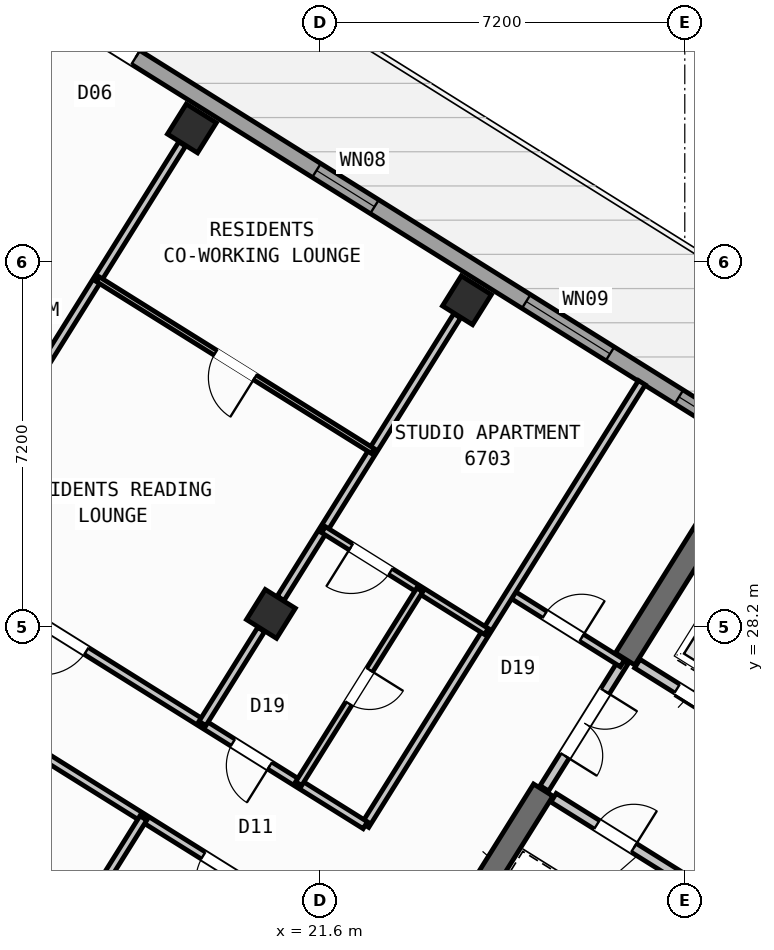
"""IFC4 building model, lengths in metres.
Left out: names, types, materials, properties, quantities, classifications, styles, units other than length and angle.
Written with IfcOpenShell. Run it as: python <this file> out.ifc"""

import sys

from ifc_helpers import new_model, si_unit, direction, frame, frame_2d, origin, origin_2d, place, context, subcontext, project, spatial, rectangle, hollow_rectangle, extrude, source, transform, mapped, element, fill, save


model = new_model("IFC4")
c1 = context("Model", 3, precision=1e-05, world=origin(), true_north=direction((0.0, 1.0)))
c2 = subcontext(c1, "Body", "Model", "MODEL_VIEW")
j1 = project(units=[si_unit("LENGTHUNIT", "METRE"), si_unit("PLANEANGLEUNIT", "RADIAN")], contexts=[c1])
p1 = place(None, origin())
s1 = spatial("IfcSite", under=j1, at=p1, CompositionType="ELEMENT")
p2 = place(p1, origin())
s2 = spatial("IfcBuilding", under=s1, at=p2, CompositionType="ELEMENT")
p3 = place(p2, frame((0.0, 0.0, 266.4)))
s3 = spatial("IfcBuildingStorey", under=s2, at=p3, CompositionType="ELEMENT", Elevation=266.4)
p4 = place(p3, frame((29.544, 30.636, 0.0), z_axis=(0.0, 0.0, 1.0), x_axis=(-0.529902075036, -0.848058836916, 0.0)))
e1 = element("IfcWall", 1, at=p4, inside=s3, PredefinedType="SHEAR", context=c2, shape_type="SweptSolid", body=[
    extrude(rectangle(XDim=3.625, YDim=0.45, at=frame_2d((1.812, 0.0))), origin(), (0.0, 0.0, 1.0), 3.35),
])
p5 = place(p3, frame((26.007, 24.976, 0.0), z_axis=(0.0, 0.0, 1.0), x_axis=(-0.529931155655, -0.848040665456, 0.0)))
e2 = element("IfcWall", 2, at=p5, inside=s3, PredefinedType="SHEAR", context=c2, shape_type="SweptSolid", body=[
    extrude(rectangle(XDim=6.475, YDim=0.45, at=frame_2d((3.238, 0.0))), origin(), (0.0, 0.0, 1.0), 3.35),
])
m1 = source(origin(), c2, "Body", "SweptSolid", [
    extrude(hollow_rectangle(XDim=0.7, YDim=0.7, WallThickness=0.028, at=origin_2d()), origin(), (0.0, 0.0, 1.0), 3.6),
])
for number, where, z_axis, x_axis in (
    (3, (24.5, 34.643, 0.0), (0.0, 0.0, 1.0), (-0.848, 0.53, 0.0)),
    (4, (20.632, 28.452, 0.0), (0.0, 0.0, 1.0), (-0.848, 0.53, 0.0)),
    (5, (19.073, 38.034, 0.0), (0.0, 0.0, 1.0), (-0.848, 0.53, 0.0)),
):
    element("IfcColumn", number, at=place(p3, frame(where, z_axis=z_axis, x_axis=x_axis)), inside=s3, PredefinedType="COLUMN", context=c2, shape_type="MappedRepresentation", body=[
        mapped(m1, transform((0.0, 0.0, 0.0), scale=1.0)),
    ])
p6 = place(p3, frame((14.138, 41.825, 0.0), z_axis=(0.0, 0.0, 1.0), x_axis=(0.848046498049, -0.529921821731, 0.0)))
e6 = element("IfcWall", 6, at=p6, inside=s3, PredefinedType="STANDARD", context=c2, shape_type="SweptSolid", body=[
    extrude(rectangle(XDim=31.588, YDim=0.32, at=frame_2d((15.794, 0.0))), origin(), (0.0, 0.0, 1.0), 3.35),
])
p7 = place(p6, frame((3.46, 0.0, 0.0)))
e7 = element("IfcOpeningElement", 7, at=p7, cuts=e6, PredefinedType="OPENING", context=c2, shape_type="SweptSolid", body=[
    extrude(rectangle(XDim=1.05, YDim=2.15, at=frame_2d((0.525, 1.075))), frame((0.0, 0.17, 0.0), z_axis=(0.0, -1.0, 0.0), x_axis=(1.0, 0.0, 0.0)), (0.0, 0.0, 1.0), 0.34),
])
p8 = place(p6, frame((0.831, 0.0, 1.0)))
e8 = element("IfcOpeningElement", 8, at=p8, cuts=e6, PredefinedType="OPENING", context=c2, shape_type="SweptSolid", body=[
    extrude(rectangle(XDim=0.9, YDim=1.25, at=frame_2d((0.45, 0.625))), frame((0.0, 0.17, 0.0), z_axis=(0.0, -1.0, 0.0), x_axis=(1.0, 0.0, 0.0)), (0.0, 0.0, 1.0), 0.34),
])
p9 = place(p6, frame((8.719, 0.0, 0.9)))
e9 = element("IfcOpeningElement", 9, at=p9, cuts=e6, PredefinedType="OPENING", context=c2, shape_type="SweptSolid", body=[
    extrude(rectangle(XDim=1.35, YDim=1.45, at=frame_2d((0.675, 0.725))), frame((0.0, 0.17, 0.0), z_axis=(0.0, -1.0, 0.0), x_axis=(1.0, 0.0, 0.0)), (0.0, 0.0, 1.0), 0.34),
])
p10 = place(p6, frame((13.599, 0.0, 0.95)))
e10 = element("IfcOpeningElement", 10, at=p10, cuts=e6, PredefinedType="OPENING", context=c2, shape_type="SweptSolid", body=[
    extrude(rectangle(XDim=1.95, YDim=1.35, at=frame_2d((0.975, 0.675))), frame((0.0, 0.17, 0.0), z_axis=(0.0, -1.0, 0.0), x_axis=(1.0, 0.0, 0.0)), (0.0, 0.0, 1.0), 0.34),
])
p11 = place(p6, frame((17.154, 0.0, 1.0)))
e11 = element("IfcOpeningElement", 11, at=p11, cuts=e6, PredefinedType="OPENING", context=c2, shape_type="SweptSolid", body=[
    extrude(rectangle(XDim=0.9, YDim=1.25, at=frame_2d((0.45, 0.625))), frame((0.0, 0.17, 0.0), z_axis=(0.0, -1.0, 0.0), x_axis=(1.0, 0.0, 0.0)), (0.0, 0.0, 1.0), 0.34),
])
p12 = place(p6, frame((21.719, 0.0, 0.9)))
e12 = element("IfcOpeningElement", 12, at=p12, cuts=e6, PredefinedType="OPENING", context=c2, shape_type="SweptSolid", body=[
    extrude(rectangle(XDim=1.65, YDim=1.45, at=frame_2d((0.825, 0.725))), frame((0.0, 0.17, 0.0), z_axis=(0.0, -1.0, 0.0), x_axis=(1.0, 0.0, 0.0)), (0.0, 0.0, 1.0), 0.34),
])
p13 = place(p6, frame((27.419, 0.0, 0.9)))
e13 = element("IfcOpeningElement", 13, at=p13, cuts=e6, PredefinedType="OPENING", context=c2, shape_type="SweptSolid", body=[
    extrude(rectangle(XDim=1.65, YDim=1.45, at=frame_2d((0.825, 0.725))), frame((0.0, 0.17, 0.0), z_axis=(0.0, -1.0, 0.0), x_axis=(1.0, 0.0, 0.0)), (0.0, 0.0, 1.0), 0.34),
])
p14 = place(p3, frame((31.822, 24.998, 0.0), z_axis=(0.0, 0.0, 1.0), x_axis=(-0.848054125777, 0.529909614701, 0.0)))
e14 = element("IfcWall", 14, at=p14, inside=s3, PredefinedType="STANDARD", context=c2, shape_type="SweptSolid", body=[
    extrude(rectangle(XDim=4.668, YDim=0.2, at=frame_2d((2.334, 0.0))), origin(), (0.0, 0.0, 1.0), 3.34),
])
p15 = place(p14, frame((0.52, 0.0, 0.0)))
e15 = element("IfcOpeningElement", 15, at=p15, cuts=e14, PredefinedType="OPENING", context=c2, shape_type="SweptSolid", body=[
    extrude(rectangle(XDim=1.2, YDim=2.15, at=frame_2d((0.6, 1.075))), frame((0.0, 0.11, 0.0), z_axis=(0.0, -1.0, 0.0), x_axis=(1.0, 0.0, 0.0)), (0.0, 0.0, 1.0), 0.22),
])
p16 = place(p14, frame((2.54, 0.0, 0.0)))
e16 = element("IfcOpeningElement", 16, at=p16, cuts=e14, PredefinedType="OPENING", context=c2, shape_type="SweptSolid", body=[
    extrude(rectangle(XDim=1.2, YDim=2.15, at=frame_2d((0.6, 1.075))), frame((0.0, 0.11, 0.0), z_axis=(0.0, -1.0, 0.0), x_axis=(1.0, 0.0, 0.0)), (0.0, 0.0, 1.0), 0.22),
])
p17 = place(p3, frame((31.525, 21.504, 0.0), z_axis=(0.0, 0.0, 1.0), x_axis=(-0.848042066329, 0.529928913853, 0.0)))
e17 = element("IfcWall", 17, at=p17, inside=s3, PredefinedType="STANDARD", context=c2, shape_type="SweptSolid", body=[
    extrude(rectangle(XDim=6.268, YDim=0.2, at=frame_2d((3.134, 0.0))), origin(), (0.0, 0.0, 1.0), 3.34),
])
p18 = place(p17, frame((4.4, 0.0, 0.0)))
e18 = element("IfcOpeningElement", 18, at=p18, cuts=e17, PredefinedType="OPENING", context=c2, shape_type="SweptSolid", body=[
    extrude(rectangle(XDim=0.86, YDim=2.05, at=frame_2d((0.43, 1.025))), frame((0.0, 0.11, 0.0), z_axis=(0.0, -1.0, 0.0), x_axis=(1.0, 0.0, 0.0)), (0.0, 0.0, 1.0), 0.22),
])
p19 = place(p17, frame((1.45, 0.0, 0.0)))
e19 = element("IfcOpeningElement", 19, at=p19, cuts=e17, PredefinedType="OPENING", context=c2, shape_type="SweptSolid", body=[
    extrude(rectangle(XDim=0.86, YDim=2.05, at=frame_2d((0.43, 1.025))), frame((0.0, 0.11, 0.0), z_axis=(0.0, -1.0, 0.0), x_axis=(1.0, 0.0, 0.0)), (0.0, 0.0, 1.0), 0.22),
])
p20 = place(p3, frame((27.596, 27.52, 0.0), z_axis=(0.0, 0.0, 1.0), x_axis=(-0.529865479138, -0.848081702443, 0.0)))
e20 = element("IfcWall", 20, at=p20, inside=s3, PredefinedType="STANDARD", context=c2, shape_type="SweptSolid", body=[
    extrude(rectangle(XDim=2.96, YDim=0.2, at=frame_2d((1.48, 0.0))), origin(), (0.0, 0.0, 1.0), 3.34),
])
p21 = place(p20, frame((0.7, 0.0, 0.0)))
e21 = element("IfcOpeningElement", 21, at=p21, cuts=e20, PredefinedType="OPENING", context=c2, shape_type="SweptSolid", body=[
    extrude(rectangle(XDim=1.5, YDim=2.15, at=frame_2d((0.75, 1.075))), frame((0.0, 0.11, 0.0), z_axis=(0.0, -1.0, 0.0), x_axis=(1.0, 0.0, 0.0)), (0.0, 0.0, 1.0), 0.22),
])
p22 = place(p3, frame((27.57, 27.478, 0.0), z_axis=(0.0, 0.0, 1.0), x_axis=(-0.848050851465, 0.529914854792, 0.0)))
e22 = element("IfcWall", 22, at=p22, inside=s3, PredefinedType="PARTITIONING", context=c2, shape_type="SweptSolid", body=[
    extrude(rectangle(XDim=2.61, YDim=0.16, at=frame_2d((1.305, 0.0))), origin(), (0.0, 0.0, 1.0), 3.34),
])
p23 = place(p22, frame((0.95, 0.0, 0.0)))
e23 = element("IfcOpeningElement", 23, at=p23, cuts=e22, PredefinedType="OPENING", context=c2, shape_type="SweptSolid", body=[
    extrude(rectangle(XDim=0.86, YDim=2.05, at=frame_2d((0.43, 1.025))), frame((0.0, 0.09, 0.0), z_axis=(0.0, -1.0, 0.0), x_axis=(1.0, 0.0, 0.0)), (0.0, 0.0, 1.0), 0.18),
])
p24 = place(p3, frame((27.953, 33.016, 0.0), z_axis=(0.0, 0.0, 1.0), x_axis=(-0.529909450694, -0.848054228257, 0.0)))
e24 = element("IfcWall", 24, at=p24, inside=s3, PredefinedType="PARTITIONING", context=c2, shape_type="SweptSolid", body=[
    extrude(rectangle(XDim=10.3, YDim=0.16, at=frame_2d((5.15, 0.0))), origin(), (0.0, 0.0, 1.0), 3.34),
])
p25 = place(p3, frame((22.495, 24.281, 0.0), z_axis=(0.0, 0.0, 1.0), x_axis=(-0.848052408131, 0.529912363569, 0.0)))
e25 = element("IfcWall", 25, at=p25, inside=s3, PredefinedType="PARTITIONING", context=c2, shape_type="SweptSolid", body=[
    extrude(rectangle(XDim=16.73, YDim=0.16, at=frame_2d((8.365, 0.0))), origin(), (0.0, 0.0, 1.0), 3.34),
])
p26 = place(p25, frame((2.22, 0.0, 0.0)))
e26 = element("IfcOpeningElement", 26, at=p26, cuts=e25, PredefinedType="OPENING", context=c2, shape_type="SweptSolid", body=[
    extrude(rectangle(XDim=0.86, YDim=2.05, at=frame_2d((0.43, 1.025))), frame((0.0, 0.09, 0.0), z_axis=(0.0, -1.0, 0.0), x_axis=(1.0, 0.0, 0.0)), (0.0, 0.0, 1.0), 0.18),
])
p27 = place(p25, frame((6.49, 0.0, 0.0)))
e27 = element("IfcOpeningElement", 27, at=p27, cuts=e25, PredefinedType="OPENING", context=c2, shape_type="SweptSolid", body=[
    extrude(rectangle(XDim=1.0, YDim=2.1, at=frame_2d((0.5, 1.05))), frame((0.0, 0.09, 0.0), z_axis=(0.0, -1.0, 0.0), x_axis=(1.0, 0.0, 0.0)), (0.0, 0.0, 1.0), 0.18),
])
p28 = place(p25, frame((14.76, 0.0, 0.0)))
e28 = element("IfcOpeningElement", 28, at=p28, cuts=e25, PredefinedType="OPENING", context=c2, shape_type="SweptSolid", body=[
    extrude(rectangle(XDim=1.0, YDim=2.1, at=frame_2d((0.5, 1.05))), frame((0.0, 0.09, 0.0), z_axis=(0.0, -1.0, 0.0), x_axis=(1.0, 0.0, 0.0)), (0.0, 0.0, 1.0), 0.18),
])
p29 = place(p3, frame((21.329, 22.416, 0.0), z_axis=(0.0, 0.0, 1.0), x_axis=(-0.848052408131, 0.529912363569, 0.0)))
e29 = element("IfcWall", 29, at=p29, inside=s3, PredefinedType="PARTITIONING", context=c2, shape_type="SweptSolid", body=[
    extrude(rectangle(XDim=16.73, YDim=0.16, at=frame_2d((8.365, 0.0))), origin(), (0.0, 0.0, 1.0), 3.34),
])
p30 = place(p29, frame((1.395, 0.0, 0.0)))
e30 = element("IfcOpeningElement", 30, at=p30, cuts=e29, PredefinedType="OPENING", context=c2, shape_type="SweptSolid", body=[
    extrude(rectangle(XDim=1.0, YDim=2.1, at=frame_2d((0.5, 1.05))), frame((0.0, 0.09, 0.0), z_axis=(0.0, -1.0, 0.0), x_axis=(1.0, 0.0, 0.0)), (0.0, 0.0, 1.0), 0.18),
])
p31 = place(p29, frame((7.82, 0.0, 0.0)))
e31 = element("IfcOpeningElement", 31, at=p31, cuts=e29, PredefinedType="OPENING", context=c2, shape_type="SweptSolid", body=[
    extrude(rectangle(XDim=1.0, YDim=2.1, at=frame_2d((0.5, 1.05))), frame((0.0, 0.09, 0.0), z_axis=(0.0, -1.0, 0.0), x_axis=(1.0, 0.0, 0.0)), (0.0, 0.0, 1.0), 0.18),
])
p32 = place(p29, frame((11.14, 0.0, 0.0)))
e32 = element("IfcOpeningElement", 32, at=p32, cuts=e29, PredefinedType="OPENING", context=c2, shape_type="SweptSolid", body=[
    extrude(rectangle(XDim=1.0, YDim=2.1, at=frame_2d((0.5, 1.05))), frame((0.0, 0.09, 0.0), z_axis=(0.0, -1.0, 0.0), x_axis=(1.0, 0.0, 0.0)), (0.0, 0.0, 1.0), 0.18),
])
p33 = place(p3, frame((18.115, 24.424, 0.0), z_axis=(0.0, 0.0, 1.0), x_axis=(-0.529998940003, -0.847998304005, 0.0)))
e33 = element("IfcWall", 33, at=p33, inside=s3, PredefinedType="PARTITIONING", context=c2, shape_type="SweptSolid", body=[
    extrude(rectangle(XDim=2.188, YDim=0.16, at=frame_2d((1.094, 0.0))), origin(), (0.0, 0.0, 1.0), 2.875),
])
p34 = place(p3, frame((24.309, 34.336, 0.0), z_axis=(0.0, 0.0, 1.0), x_axis=(-0.529895484599, -0.848062954858, 0.0)))
e34 = element("IfcWall", 34, at=p34, inside=s3, PredefinedType="PARTITIONING", context=c2, shape_type="SweptSolid", body=[
    extrude(rectangle(XDim=6.576, YDim=0.16, at=frame_2d((3.288, 0.0))), origin(), (0.0, 0.0, 1.0), 2.875),
])
p35 = place(p3, frame((20.44, 28.145, 0.0), z_axis=(0.0, 0.0, 1.0), x_axis=(-0.5299186965, -0.848048450915, 0.0)))
e35 = element("IfcWall", 35, at=p35, inside=s3, PredefinedType="PARTITIONING", context=c2, shape_type="SweptSolid", body=[
    extrude(rectangle(XDim=2.188, YDim=0.16, at=frame_2d((1.094, 0.0))), origin(), (0.0, 0.0, 1.0), 2.875),
])
p36 = place(p3, frame((24.885, 28.106, 0.0), z_axis=(0.0, 0.0, 1.0), x_axis=(-0.848059820872, 0.529900500304, 0.0)))
e36 = element("IfcWall", 36, at=p36, inside=s3, PredefinedType="PLUMBINGWALL", context=c2, shape_type="SweptSolid", body=[
    extrude(rectangle(XDim=3.79, YDim=0.14, at=frame_2d((1.895, 0.0))), origin(), (0.0, 0.0, 1.0), 3.34),
])
p37 = place(p36, frame((2.23, 0.0, 0.0)))
e37 = element("IfcOpeningElement", 37, at=p37, cuts=e36, PredefinedType="OPENING", context=c2, shape_type="SweptSolid", body=[
    extrude(rectangle(XDim=0.92, YDim=2.08, at=frame_2d((0.46, 1.04))), frame((0.0, 0.08, 0.0), z_axis=(0.0, -1.0, 0.0), x_axis=(1.0, 0.0, 0.0)), (0.0, 0.0, 1.0), 0.16),
])
p38 = place(p3, frame((23.57, 28.927, 0.0), z_axis=(0.0, 0.0, 1.0), x_axis=(-0.529911350634, -0.84805304107, 0.0)))
e38 = element("IfcWall", 38, at=p38, inside=s3, PredefinedType="PLUMBINGWALL", context=c2, shape_type="SweptSolid", body=[
    extrude(rectangle(XDim=4.51, YDim=0.14, at=frame_2d((2.255, 0.0))), origin(), (0.0, 0.0, 1.0), 3.025),
])
p39 = place(p38, frame((1.865, 0.0, 0.0)))
e39 = element("IfcOpeningElement", 39, at=p39, cuts=e38, PredefinedType="OPENING", context=c2, shape_type="SweptSolid", body=[
    extrude(rectangle(XDim=0.78, YDim=2.05, at=frame_2d((0.39, 1.025))), frame((0.0, 0.08, 0.0), z_axis=(0.0, -1.0, 0.0), x_axis=(1.0, 0.0, 0.0)), (0.0, 0.0, 1.0), 0.16),
])
p40 = place(p3, frame((18.881, 37.727, 0.0), z_axis=(0.0, 0.0, 1.0), x_axis=(-0.529938869374, -0.84803584519, 0.0)))
e40 = element("IfcWall", 40, at=p40, inside=s3, PredefinedType="PARTITIONING", context=c2, shape_type="SweptSolid", body=[
    extrude(rectangle(XDim=6.576, YDim=0.16, at=frame_2d((3.288, 0.0))), origin(), (0.0, 0.0, 1.0), 2.875),
])
p41 = place(p3, frame((22.642, 31.668, 0.0), z_axis=(0.0, 0.0, 1.0), x_axis=(-0.84806687439, 0.529889211593, 0.0)))
e41 = element("IfcWall", 41, at=p41, inside=s3, PredefinedType="PARTITIONING", context=c2, shape_type="SweptSolid", body=[
    extrude(rectangle(XDim=6.4, YDim=0.11, at=frame_2d((3.2, 0.0))), origin(), (0.0, 0.0, 1.0), 3.34),
])
p42 = place(p41, frame((2.74, 0.0, 0.0)))
e42 = element("IfcOpeningElement", 42, at=p42, cuts=e41, PredefinedType="OPENING", context=c2, shape_type="SweptSolid", body=[
    extrude(rectangle(XDim=0.92, YDim=2.08, at=frame_2d((0.46, 1.04))), frame((0.0, 0.065, 0.0), z_axis=(0.0, -1.0, 0.0), x_axis=(1.0, 0.0, 0.0)), (0.0, 0.0, 1.0), 0.13),
])
p43 = place(p3, frame((16.385, 40.563, 0.0), z_axis=(0.0, 0.0, 1.0), x_axis=(-0.529924195719, -0.848045014602, 0.0)))
e43 = element("IfcWall", 43, at=p43, inside=s3, PredefinedType="PARTITIONING", context=c2, shape_type="SweptSolid", body=[
    extrude(rectangle(XDim=10.57, YDim=0.11, at=frame_2d((5.285, 0.0))), origin(), (0.0, 0.0, 1.0), 3.34),
])
p44 = place(p43, frame((8.93, 0.0, 0.0)))
e44 = element("IfcOpeningElement", 44, at=p44, cuts=e43, PredefinedType="OPENING", context=c2, shape_type="SweptSolid", body=[
    extrude(rectangle(XDim=0.78, YDim=2.05, at=frame_2d((0.39, 1.025))), frame((0.0, 0.065, 0.0), z_axis=(0.0, -1.0, 0.0), x_axis=(1.0, 0.0, 0.0)), (0.0, 0.0, 1.0), 0.13),
])
p45 = place(p43, frame((3.625, 0.0, 0.0)))
e45 = element("IfcOpeningElement", 45, at=p45, cuts=e43, PredefinedType="OPENING", context=c2, shape_type="SweptSolid", body=[
    extrude(rectangle(XDim=0.92, YDim=2.08, at=frame_2d((0.46, 1.04))), frame((0.0, 0.065, 0.0), z_axis=(0.0, -1.0, 0.0), x_axis=(1.0, 0.0, 0.0)), (0.0, 0.0, 1.0), 0.13),
])
m2 = source(origin(), c2, "Body", "SweptSolid", [
    extrude(rectangle(XDim=1.05, YDim=2.15, at=frame_2d((0.525, 1.075))), frame((0.0, 0.025, 0.0), z_axis=(0.0, -1.0, 0.0), x_axis=(1.0, 0.0, 0.0)), (0.0, 0.0, 1.0), 0.05),
])
p46 = place(p7, origin())
e46 = element("IfcDoor", 46, at=p46, inside=s3, OperationType="SINGLE_SWING_RIGHT", PredefinedType="DOOR", context=c2, shape_type="MappedRepresentation", body=[
    mapped(m2, transform((0.0, 0.0, 0.0), scale=1.0)),
])
fill(e7, e46)
m3 = source(origin(), c2, "Body", "SweptSolid", [
    extrude(rectangle(XDim=1.35, YDim=1.45, at=frame_2d((0.675, 0.725))), frame((0.0, 0.03, 0.0), z_axis=(0.0, -1.0, 0.0), x_axis=(1.0, 0.0, 0.0)), (0.0, 0.0, 1.0), 0.06),
])
p47 = place(p9, origin())
e47 = element("IfcWindow", 47, at=p47, inside=s3, PartitioningType="SINGLE_PANEL", PredefinedType="WINDOW", context=c2, shape_type="MappedRepresentation", body=[
    mapped(m3, transform((0.0, 0.0, 0.0), scale=1.0)),
])
fill(e9, e47)
m4 = source(origin(), c2, "Body", "SweptSolid", [
    extrude(rectangle(XDim=1.95, YDim=1.35, at=frame_2d((0.975, 0.675))), frame((0.0, 0.03, 0.0), z_axis=(0.0, -1.0, 0.0), x_axis=(1.0, 0.0, 0.0)), (0.0, 0.0, 1.0), 0.06),
])
p48 = place(p10, origin())
e48 = element("IfcWindow", 48, at=p48, inside=s3, PartitioningType="SINGLE_PANEL", PredefinedType="WINDOW", context=c2, shape_type="MappedRepresentation", body=[
    mapped(m4, transform((0.0, 0.0, 0.0), scale=1.0)),
])
fill(e10, e48)
m5 = source(origin(), c2, "Body", "SweptSolid", [
    extrude(rectangle(XDim=0.9, YDim=1.25, at=frame_2d((0.45, 0.625))), frame((0.0, 0.03, 0.0), z_axis=(0.0, -1.0, 0.0), x_axis=(1.0, 0.0, 0.0)), (0.0, 0.0, 1.0), 0.06),
])
p49 = place(p11, origin())
e49 = element("IfcWindow", 49, at=p49, inside=s3, PartitioningType="SINGLE_PANEL", PredefinedType="WINDOW", context=c2, shape_type="MappedRepresentation", body=[
    mapped(m5, transform((0.0, 0.0, 0.0), scale=1.0)),
])
fill(e11, e49)
m6 = source(origin(), c2, "Body", "SweptSolid", [
    extrude(rectangle(XDim=1.2, YDim=2.15, at=frame_2d((0.6, 1.075))), frame((0.0, 0.025, 0.0), z_axis=(0.0, -1.0, 0.0), x_axis=(1.0, 0.0, 0.0)), (0.0, 0.0, 1.0), 0.05),
])
p50 = place(p16, origin())
e50 = element("IfcDoor", 50, at=p50, inside=s3, OperationType="DOUBLE_DOOR_SLIDING", PredefinedType="DOOR", context=c2, shape_type="MappedRepresentation", body=[
    mapped(m6, transform((0.0, 0.0, 0.0), scale=1.0)),
])
fill(e16, e50)
m7 = source(origin(), c2, "Body", "SweptSolid", [
    extrude(rectangle(XDim=0.86, YDim=2.05, at=frame_2d((0.43, 1.025))), frame((0.0, 0.025, 0.0), z_axis=(0.0, -1.0, 0.0), x_axis=(1.0, 0.0, 0.0)), (0.0, 0.0, 1.0), 0.05),
])
p51 = place(p18, frame((0.86, 0.0, 0.0), z_axis=(0.0, 0.0, 1.0), x_axis=(-1.0, 0.0, 0.0)))
e51 = element("IfcDoor", 51, at=p51, inside=s3, OperationType="SINGLE_SWING_RIGHT", PredefinedType="DOOR", context=c2, shape_type="MappedRepresentation", body=[
    mapped(m7, transform((0.0, 0.0, 0.0), scale=1.0)),
])
fill(e18, e51)
p52 = place(p23, frame((0.86, 0.0, 0.0), z_axis=(0.0, 0.0, 1.0), x_axis=(-1.0, 0.0, 0.0)))
e52 = element("IfcDoor", 52, at=p52, inside=s3, OperationType="SINGLE_SWING_RIGHT", PredefinedType="DOOR", context=c2, shape_type="MappedRepresentation", body=[
    mapped(m7, transform((0.0, 0.0, 0.0), scale=1.0)),
])
fill(e23, e52)
m8 = source(origin(), c2, "Body", "SweptSolid", [
    extrude(rectangle(XDim=1.5, YDim=2.15, at=frame_2d((0.75, 1.075))), frame((0.0, 0.025, 0.0), z_axis=(0.0, -1.0, 0.0), x_axis=(1.0, 0.0, 0.0)), (0.0, 0.0, 1.0), 0.05),
])
p53 = place(p21, origin())
e53 = element("IfcDoor", 53, at=p53, inside=s3, OperationType="DOUBLE_DOOR_SINGLE_SWING", PredefinedType="DOOR", context=c2, shape_type="MappedRepresentation", body=[
    mapped(m8, transform((0.0, 0.0, 0.0), scale=1.0)),
])
fill(e21, e53)
m9 = source(origin(), c2, "Body", "SweptSolid", [
    extrude(rectangle(XDim=1.0, YDim=2.1, at=frame_2d((0.5, 1.05))), frame((0.0, 0.025, 0.0), z_axis=(0.0, -1.0, 0.0), x_axis=(1.0, 0.0, 0.0)), (0.0, 0.0, 1.0), 0.05),
])
p54 = place(p30, origin())
e54 = element("IfcDoor", 54, at=p54, inside=s3, OperationType="SINGLE_SWING_LEFT", PredefinedType="DOOR", context=c2, shape_type="MappedRepresentation", body=[
    mapped(m9, transform((0.0, 0.0, 0.0), scale=1.0)),
])
fill(e30, e54)
p55 = place(p26, origin())
e55 = element("IfcDoor", 55, at=p55, inside=s3, OperationType="SINGLE_SWING_LEFT", PredefinedType="DOOR", context=c2, shape_type="MappedRepresentation", body=[
    mapped(m7, transform((0.0, 0.0, 0.0), scale=1.0)),
])
fill(e26, e55)
m10 = source(origin(), c2, "Body", "SweptSolid", [
    extrude(rectangle(XDim=0.92, YDim=2.08, at=frame_2d((0.46, 1.04))), frame((0.0, 0.025, 0.0), z_axis=(0.0, -1.0, 0.0), x_axis=(1.0, 0.0, 0.0)), (0.0, 0.0, 1.0), 0.05),
])
p56 = place(p37, origin())
e56 = element("IfcDoor", 56, at=p56, inside=s3, OperationType="SINGLE_SWING_RIGHT", PredefinedType="DOOR", context=c2, shape_type="MappedRepresentation", body=[
    mapped(m10, transform((0.0, 0.0, 0.0), scale=1.0)),
])
fill(e37, e56)
m11 = source(origin(), c2, "Body", "SweptSolid", [
    extrude(rectangle(XDim=0.78, YDim=2.05, at=frame_2d((0.39, 1.025))), frame((0.0, 0.025, 0.0), z_axis=(0.0, -1.0, 0.0), x_axis=(1.0, 0.0, 0.0)), (0.0, 0.0, 1.0), 0.05),
])
p57 = place(p39, origin())
e57 = element("IfcDoor", 57, at=p57, inside=s3, OperationType="SINGLE_SWING_LEFT", PredefinedType="DOOR", context=c2, shape_type="MappedRepresentation", body=[
    mapped(m11, transform((0.0, 0.0, 0.0), scale=1.0)),
])
fill(e39, e57)
p58 = place(p27, origin())
e58 = element("IfcDoor", 58, at=p58, inside=s3, OperationType="SINGLE_SWING_RIGHT", PredefinedType="DOOR", context=c2, shape_type="MappedRepresentation", body=[
    mapped(m9, transform((0.0, 0.0, 0.0), scale=1.0)),
])
fill(e27, e58)
p59 = place(p42, origin())
e59 = element("IfcDoor", 59, at=p59, inside=s3, OperationType="SINGLE_SWING_LEFT", PredefinedType="DOOR", context=c2, shape_type="MappedRepresentation", body=[
    mapped(m10, transform((0.0, 0.0, 0.0), scale=1.0)),
])
fill(e42, e59)
save(model, sys.argv[1])
